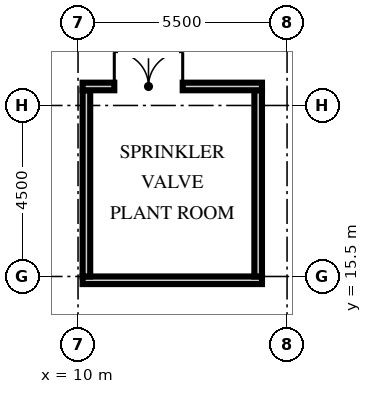
"""IFC4 building model, lengths in metres.
Left out: names, types, materials, properties, quantities, classifications, styles, units other than length and angle.
Written with IfcOpenShell. Run it as: python <this file> out.ifc"""

import sys

from ifc_helpers import new_model, si_unit, direction, frame, frame_2d, origin, origin_2d, place, context, subcontext, project, spatial, rectangle, extrude, element, fill, save


model = new_model("IFC4")
c1 = context("Model", 3, precision=1e-05, world=origin(), true_north=direction((0.0, 1.0)))
c2 = subcontext(c1, "Body", "Model", "MODEL_VIEW")
j1 = project(units=[si_unit("LENGTHUNIT", "METRE"), si_unit("PLANEANGLEUNIT", "RADIAN")], contexts=[c1])
p1 = place(None, origin())
s1 = spatial("IfcSite", under=j1, at=p1, CompositionType="ELEMENT")
p2 = place(p1, origin())
s2 = spatial("IfcBuilding", under=s1, at=p2, CompositionType="ELEMENT")
p3 = place(p2, frame((0.0, 0.0, 278.25)))
s3 = spatial("IfcBuildingStorey", under=s2, at=p3, CompositionType="ELEMENT", Elevation=278.25)
p4 = place(p3, frame((8.32, 24.4, -0.65), z_axis=(-0.103601510687, -0.332963994967, 0.937230870724), x_axis=(0.994618884766, -0.034712905596, 0.097612951251)))
e1 = element("IfcColumn", 1, at=p4, inside=s3, PredefinedType="COLUMN", context=c2, shape_type="SweptSolid", body=[
    extrude(rectangle(XDim=2.8, YDim=1.8, at=origin_2d()), origin(), (0.0, 0.0, 1.0), 8.109),
])
p5 = place(p3, frame((16.64, 24.4, -0.65), z_axis=(-0.203917129379, -0.327731366633, 0.922502008492), x_axis=(0.978988153279, -0.068255512614, 0.192154575114)))
e2 = element("IfcColumn", 2, at=p5, inside=s3, PredefinedType="COLUMN", context=c2, shape_type="SweptSolid", body=[
    extrude(rectangle(XDim=2.8, YDim=1.8, at=origin_2d()), origin(), (0.0, 0.0, 1.0), 8.238),
])
p6 = place(p3, frame((10.12, 15.4, 0.0), z_axis=(0.0, 0.0, 1.0), x_axis=(1.0, 0.0, 0.0)))
e3 = element("IfcWall", 3, at=p6, inside=s3, PredefinedType="SOLIDWALL", context=c2, shape_type="SweptSolid", body=[
    extrude(rectangle(XDim=4.72, YDim=0.2, at=frame_2d((2.36, 0.0))), origin(), (0.0, 0.0, 1.0), 6.25),
])
p7 = place(p3, frame((10.22, 15.5, 0.0), z_axis=(0.0, 0.0, 1.0), x_axis=(0.0, 1.0, 0.0)))
e4 = element("IfcWall", 4, at=p7, inside=s3, PredefinedType="SOLIDWALL", context=c2, shape_type="SweptSolid", body=[
    extrude(rectangle(XDim=4.9, YDim=0.2, at=frame_2d((2.45, 0.0))), origin(), (0.0, 0.0, 1.0), 7.25),
])
p8 = place(p3, frame((14.74, 15.5, 0.0), z_axis=(0.0, 0.0, 1.0), x_axis=(0.0, 1.0, 0.0)))
e5 = element("IfcWall", 5, at=p8, inside=s3, PredefinedType="SOLIDWALL", context=c2, shape_type="SweptSolid", body=[
    extrude(rectangle(XDim=4.9, YDim=0.2, at=frame_2d((2.45, 0.0))), origin(), (0.0, 0.0, 1.0), 6.25),
])
p9 = place(p3, frame((10.12, 20.5, 0.0), z_axis=(0.0, 0.0, 1.0), x_axis=(1.0, 0.0, 0.0)))
e6 = element("IfcWall", 6, at=p9, inside=s3, PredefinedType="SOLIDWALL", context=c2, shape_type="SweptSolid", body=[
    extrude(rectangle(XDim=4.72, YDim=0.2, at=frame_2d((2.36, 0.0))), origin(), (0.0, 0.0, 1.0), 6.25),
])
p10 = place(p9, frame((0.834, 0.0, 0.0)))
e7 = element("IfcOpeningElement", 7, at=p10, cuts=e6, PredefinedType="OPENING", context=c2, shape_type="SweptSolid", body=[
    extrude(rectangle(XDim=1.8, YDim=2.4, at=frame_2d((0.9, 1.2))), frame((0.0, 0.11, 0.0), z_axis=(0.0, -1.0, 0.0), x_axis=(1.0, 0.0, 0.0)), (0.0, 0.0, 1.0), 0.22),
])
p11 = place(p10, origin())
e8 = element("IfcDoor", 8, at=p11, inside=s3, OperationType="DOUBLE_DOOR_SINGLE_SWING", PredefinedType="DOOR", context=c2, shape_type="SweptSolid", body=[
    extrude(rectangle(XDim=1.8, YDim=2.4, at=frame_2d((0.9, 1.2))), frame((0.0, 0.025, 0.0), z_axis=(0.0, -1.0, 0.0), x_axis=(1.0, 0.0, 0.0)), (0.0, 0.0, 1.0), 0.05),
])
fill(e7, e8)
save(model, sys.argv[1])
